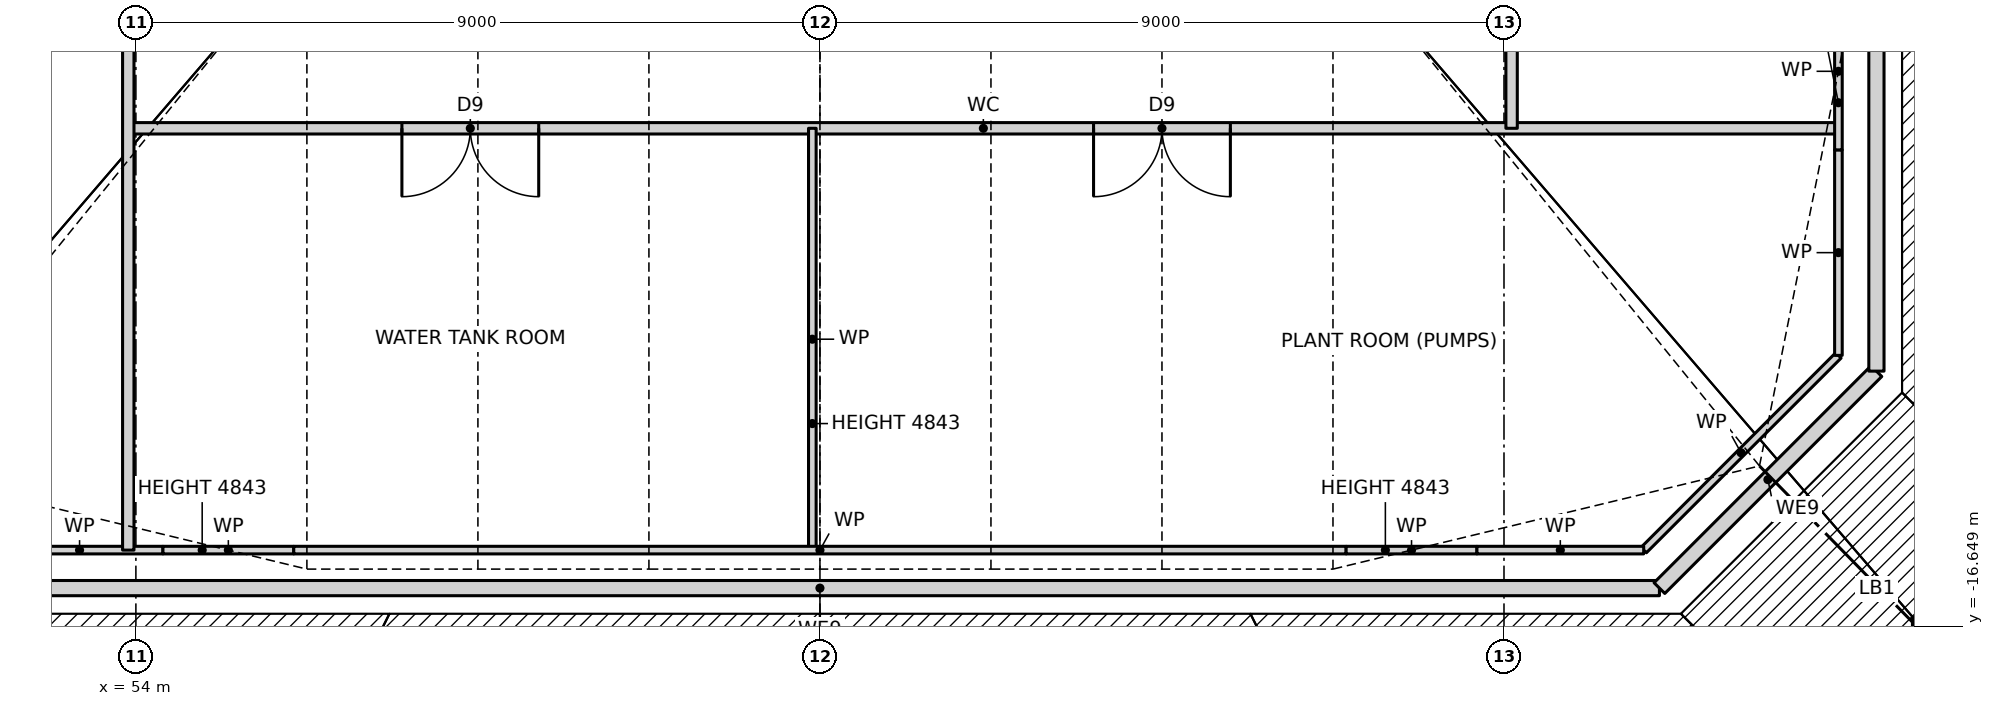
"""IFC4 building model, lengths in metres.
Left out: names, types, materials, properties, quantities, classifications, styles, units other than length and angle.
Written with IfcOpenShell. Run it as: python <this file> out.ifc"""

import sys

from ifc_helpers import new_model, si_unit, direction, frame, frame_2d, origin, origin_2d, place, context, subcontext, project, spatial, rectangle, i_section, extrude, clip, halfspace, element, fill, save


model = new_model("IFC4")
c1 = context("Model", 3, precision=1e-05, world=origin(), true_north=direction((0.0, 1.0)))
c2 = subcontext(c1, "Body", "Model", "MODEL_VIEW")
j1 = project(units=[si_unit("LENGTHUNIT", "METRE"), si_unit("PLANEANGLEUNIT", "RADIAN")], contexts=[c1])
p1 = place(None, origin())
s1 = spatial("IfcSite", under=j1, at=p1, CompositionType="ELEMENT")
p2 = place(p1, origin())
s2 = spatial("IfcBuilding", under=s1, at=p2, CompositionType="ELEMENT")
p3 = place(p2, frame((0.0, 0.0, 74.5)))
s3 = spatial("IfcBuildingStorey", under=s2, at=p3, CompositionType="ELEMENT", Elevation=74.5)
p4 = place(p3, frame((54.9, -18.15, 0.0), z_axis=(0.206163197348, 0.343580475001, 0.916214600002), x_axis=(-0.857476506072, 0.514523120505, 0.0)))
e1 = element("IfcColumn", 1, at=p4, inside=s3, PredefinedType="COLUMN", context=c2, shape_type="Clipping", body=[
    clip(clip(extrude(i_section(OverallWidth=0.424, OverallDepth=0.475, WebThickness=0.048, FlangeThickness=0.077, at=origin_2d()), origin(), (0.0, 0.0, 1.0), 6.549), halfspace(frame((0.0, 0.0, 0.0), z_axis=(0.0, -0.400687916891, -0.916214600002), x_axis=(-0.857476506072, -0.471413595046, 0.206163197348)), False)), halfspace(frame((0.0, 2.404, 5.497), z_axis=(0.0, 0.400687916891, 0.916214600002), x_axis=(-0.857476506072, -0.471413595046, 0.206163197348)), False)),
])
p5 = place(p3, frame((60.3, -18.15, 0.0), z_axis=(0.070044605522, 0.350261033367, 0.934029422311), x_axis=(-0.980584767795, 0.196095673508, 0.0)))
e2 = element("IfcColumn", 2, at=p5, inside=s3, PredefinedType="COLUMN", context=c2, shape_type="Clipping", body=[
    clip(clip(extrude(i_section(OverallWidth=0.424, OverallDepth=0.475, WebThickness=0.048, FlangeThickness=0.077, at=origin_2d()), origin(), (0.0, 0.0, 1.0), 6.424), halfspace(frame((0.0, 0.0, 0.0), z_axis=(0.0, -0.357196078167, -0.934029422311), x_axis=(-0.980584767795, -0.183159128644, 0.070044605522)), False)), halfspace(frame((0.0, 2.143, 5.604), z_axis=(0.0, 0.357196078167, 0.934029422311), x_axis=(-0.980584767795, -0.183159128644, 0.070044605522)), False)),
])
p6 = place(p3, frame((65.7, -18.15, 0.0), z_axis=(-0.070044605522, 0.350261033367, 0.934029422311), x_axis=(-0.980584767795, -0.196095673508, 0.0)))
e3 = element("IfcColumn", 3, at=p6, inside=s3, PredefinedType="COLUMN", context=c2, shape_type="Clipping", body=[
    clip(clip(extrude(i_section(OverallWidth=0.424, OverallDepth=0.475, WebThickness=0.048, FlangeThickness=0.077, at=origin_2d()), origin(), (0.0, 0.0, 1.0), 6.424), halfspace(frame((0.0, 0.0, 0.0), z_axis=(0.0, -0.357196078167, -0.934029422311), x_axis=(-0.980584767795, 0.183159128644, -0.070044605522)), False)), halfspace(frame((0.0, 2.143, 5.604), z_axis=(0.0, 0.357196078167, 0.934029422311), x_axis=(-0.980584767795, 0.183159128644, -0.070044605522)), False)),
])
p7 = place(p3, frame((71.1, -18.15, 0.0), z_axis=(-0.206163197348, 0.343580475001, 0.916214600002), x_axis=(-0.857476506072, -0.514523120505, 0.0)))
e4 = element("IfcColumn", 4, at=p7, inside=s3, PredefinedType="COLUMN", context=c2, shape_type="Clipping", body=[
    clip(clip(extrude(i_section(OverallWidth=0.424, OverallDepth=0.475, WebThickness=0.048, FlangeThickness=0.077, at=origin_2d()), origin(), (0.0, 0.0, 1.0), 6.549), halfspace(frame((0.0, 0.0, 0.0), z_axis=(0.0, -0.400687916891, -0.916214600002), x_axis=(-0.857476506072, 0.471413595046, -0.206163197348)), False)), halfspace(frame((0.0, 2.404, 5.497), z_axis=(0.0, 0.400687916891, 0.916214600002), x_axis=(-0.857476506072, 0.471413595046, -0.206163197348)), False)),
])
p8 = place(p3, frame((77.606, -16.797, 0.0), z_axis=(-0.330551321937, 0.331953334069, 0.883483337458), x_axis=(-0.708601594959, -0.705608800698, 0.0)))
e5 = element("IfcColumn", 5, at=p8, inside=s3, PredefinedType="COLUMN", context=c2, shape_type="Clipping", body=[
    clip(clip(extrude(i_section(OverallWidth=0.424, OverallDepth=0.475, WebThickness=0.048, FlangeThickness=0.077, at=origin_2d()), origin(), (0.0, 0.0, 1.0), 6.791), halfspace(frame((0.0, 0.0, 0.0), z_axis=(0.0, -0.468462583814, -0.883483337458), x_axis=(-0.708601594959, 0.62339361818, -0.330551321937)), False)), halfspace(frame((0.0, 2.811, 5.301), z_axis=(0.0, 0.468462583814, 0.883483337458), x_axis=(-0.708601594959, 0.62339361818, -0.330551321937)), False)),
])
p9 = place(p3, frame((78.9, -9.45, 0.0), z_axis=(-0.343583115532, 0.206127500627, 0.91622164142), x_axis=(-0.514454704863, -0.857517554715, 0.0)))
e6 = element("IfcColumn", 6, at=p9, inside=s3, PredefinedType="COLUMN", context=c2, shape_type="Clipping", body=[
    clip(clip(extrude(i_section(OverallWidth=0.424, OverallDepth=0.475, WebThickness=0.048, FlangeThickness=0.077, at=origin_2d()), origin(), (0.0, 0.0, 1.0), 6.549), halfspace(frame((0.0, 0.0, 0.0), z_axis=(0.0, -0.400671815572, -0.91622164142), x_axis=(-0.514454704863, 0.785676141527, -0.343583115532)), False)), halfspace(frame((0.0, 2.404, 5.497), z_axis=(0.0, 0.400671815572, 0.91622164142), x_axis=(-0.514454704863, 0.785676141527, -0.343583115532)), False)),
])
p10 = place(p3, frame((51.955, -16.15, 0.0), z_axis=(0.0, 0.0, 1.0), x_axis=(1.0, 0.0, 0.0)))
e7 = element("IfcWall", 7, at=p10, inside=s3, PredefinedType="PARTITIONING", context=c2, shape_type="SweptSolid", body=[
    extrude(rectangle(XDim=22.09, YDim=0.2, at=frame_2d((11.045, 0.0))), origin(), (0.0, 0.0, 1.0), 5.7),
])
p11 = place(p3, frame((74.045, -16.15, 0.0), z_axis=(0.0, 0.0, 1.0), x_axis=(0.707106781187, 0.707106781187, 0.0)))
e8 = element("IfcWall", 8, at=p11, inside=s3, PredefinedType="PARTITIONING", context=c2, shape_type="SweptSolid", body=[
    extrude(rectangle(XDim=4.038, YDim=0.2, at=frame_2d((2.019, 0.0))), origin(), (0.0, 0.0, 1.0), 5.7),
])
p12 = place(p3, frame((76.9, -13.295, 0.0), z_axis=(0.0, 0.0, 1.0), x_axis=(0.0, 1.0, 0.0)))
e9 = element("IfcWall", 9, at=p12, inside=s3, PredefinedType="PARTITIONING", context=c2, shape_type="SweptSolid", body=[
    extrude(rectangle(XDim=26.59, YDim=0.2, at=frame_2d((13.295, 0.0))), origin(), (0.0, 0.0, 1.0), 5.7),
])
p13 = place(p3, frame((52.162, -15.65, 0.0), z_axis=(0.0, 0.0, 1.0), x_axis=(1.0, 0.0, 0.0)))
e10 = element("IfcWall", 10, at=p13, inside=s3, PredefinedType="PARTITIONING", context=c2, shape_type="SweptSolid", body=[
    extrude(rectangle(XDim=2.194, YDim=0.1, at=frame_2d((1.097, 0.0))), origin(), (0.0, 0.0, 1.0), 5.77),
])
p14 = place(p3, frame((53.9, -10.1, 0.0), z_axis=(0.0, 0.0, 1.0), x_axis=(1.0, 0.0, 0.0)))
e11 = element("IfcWall", 11, at=p14, inside=s3, PredefinedType="PARTITIONING", context=c2, shape_type="SweptSolid", body=[
    extrude(rectangle(XDim=22.5, YDim=0.15, at=frame_2d((11.25, 0.0))), origin(), (0.0, 0.0, 1.0), 5.77),
])
p15 = place(p14, frame((3.6, 0.0, 0.0)))
e12 = element("IfcOpeningElement", 12, at=p15, cuts=e11, PredefinedType="OPENING", context=c2, shape_type="SweptSolid", body=[
    extrude(rectangle(XDim=1.8, YDim=2.1, at=frame_2d((0.9, 1.05))), frame((0.0, 0.085, 0.0), z_axis=(0.0, -1.0, 0.0), x_axis=(1.0, 0.0, 0.0)), (0.0, 0.0, 1.0), 0.17),
])
p16 = place(p14, frame((12.7, 0.0, 0.0)))
e13 = element("IfcOpeningElement", 13, at=p16, cuts=e11, PredefinedType="OPENING", context=c2, shape_type="SweptSolid", body=[
    extrude(rectangle(XDim=1.8, YDim=2.1, at=frame_2d((0.9, 1.05))), frame((0.0, 0.085, 0.0), z_axis=(0.0, -1.0, 0.0), x_axis=(1.0, 0.0, 0.0)), (0.0, 0.0, 1.0), 0.17),
])
p17 = place(p3, frame((73.838, -15.65, 0.0), z_axis=(0.0, 0.0, 1.0), x_axis=(0.707106781187, 0.707106781187, 0.0)))
e14 = element("IfcWall", 14, at=p17, inside=s3, PredefinedType="PARTITIONING", context=c2, shape_type="SweptSolid", body=[
    extrude(rectangle(XDim=3.623, YDim=0.1, at=frame_2d((1.812, 0.0))), origin(), (0.0, 0.0, 1.0), 5.77),
])
p18 = place(p3, frame((76.4, -13.088, 0.0), z_axis=(0.0, 0.0, 1.0), x_axis=(0.0, 1.0, 0.0)))
e15 = element("IfcWall", 15, at=p18, inside=s3, PredefinedType="PARTITIONING", context=c2, shape_type="SweptSolid", body=[
    extrude(rectangle(XDim=2.704, YDim=0.1, at=frame_2d((1.352, 0.0))), origin(), (0.0, 0.0, 1.0), 5.77),
])
p19 = place(p3, frame((72.1, -10.1, 0.0), z_axis=(0.0, 0.0, 1.0), x_axis=(0.0, 1.0, 0.0)))
e16 = element("IfcWall", 16, at=p19, inside=s3, PredefinedType="PARTITIONING", context=c2, shape_type="SweptSolid", body=[
    extrude(rectangle(XDim=25.75, YDim=0.15, at=frame_2d((12.875, 0.0))), origin(), (0.0, 0.0, 1.0), 5.77),
])
p20 = place(p19, frame((9.2, 0.0, 0.0)))
e17 = element("IfcOpeningElement", 17, at=p20, cuts=e16, PredefinedType="OPENING", context=c2, shape_type="SweptSolid", body=[
    extrude(rectangle(XDim=1.8, YDim=2.1, at=frame_2d((0.9, 1.05))), frame((0.0, 0.085, 0.0), z_axis=(0.0, -1.0, 0.0), x_axis=(1.0, 0.0, 0.0)), (0.0, 0.0, 1.0), 0.17),
])
p21 = place(p3, frame((62.9, -15.65, 0.0), z_axis=(0.0, 0.0, 1.0), x_axis=(0.0, 1.0, 0.0)))
e18 = element("IfcWall", 18, at=p21, inside=s3, PredefinedType="PARTITIONING", context=c2, shape_type="SweptSolid", body=[
    extrude(rectangle(XDim=5.55, YDim=0.1, at=frame_2d((2.775, 0.0))), origin(), (0.0, 0.0, 1.0), 4.843),
])
p22 = place(p3, frame((53.9, -15.65, 0.0), z_axis=(0.0, 0.0, 1.0), x_axis=(0.0, 1.0, 0.0)))
e19 = element("IfcWall", 19, at=p22, inside=s3, PredefinedType="PARTITIONING", context=c2, shape_type="SweptSolid", body=[
    extrude(rectangle(XDim=25.75, YDim=0.15, at=frame_2d((12.875, 0.0))), origin(), (0.0, 0.0, 1.0), 5.77),
])
p23 = place(p22, frame((14.75, 0.0, 0.0)))
e20 = element("IfcOpeningElement", 20, at=p23, cuts=e19, PredefinedType="OPENING", context=c2, shape_type="SweptSolid", body=[
    extrude(rectangle(XDim=1.8, YDim=2.1, at=frame_2d((0.9, 1.05))), frame((0.0, 0.085, 0.0), z_axis=(0.0, -1.0, 0.0), x_axis=(1.0, 0.0, 0.0)), (0.0, 0.0, 1.0), 0.17),
])
p24 = place(p3, frame((54.356, -15.65, 0.0), z_axis=(0.0, 0.0, 1.0), x_axis=(1.0, 0.0, 0.0)))
e21 = element("IfcWall", 21, at=p24, inside=s3, PredefinedType="PARTITIONING", context=c2, shape_type="SweptSolid", body=[
    extrude(rectangle(XDim=1.721, YDim=0.1, at=frame_2d((0.86, 0.0))), origin(), (0.0, 0.0, 1.0), 4.843),
])
p25 = place(p3, frame((56.077, -15.65, 0.0), z_axis=(0.0, 0.0, 1.0), x_axis=(1.0, 0.0, 0.0)))
e22 = element("IfcWall", 22, at=p25, inside=s3, PredefinedType="PARTITIONING", context=c2, shape_type="SweptSolid", body=[
    extrude(rectangle(XDim=13.846, YDim=0.1, at=frame_2d((6.923, 0.0))), origin(), (0.0, 0.0, 1.0), 5.77),
])
p26 = place(p3, frame((69.923, -15.65, 0.0), z_axis=(0.0, 0.0, 1.0), x_axis=(1.0, 0.0, 0.0)))
e23 = element("IfcWall", 23, at=p26, inside=s3, PredefinedType="PARTITIONING", context=c2, shape_type="SweptSolid", body=[
    extrude(rectangle(XDim=1.721, YDim=0.1, at=frame_2d((0.86, 0.0))), origin(), (0.0, 0.0, 1.0), 4.843),
])
p27 = place(p3, frame((71.644, -15.65, 0.0), z_axis=(0.0, 0.0, 1.0), x_axis=(1.0, 0.0, 0.0)))
e24 = element("IfcWall", 24, at=p27, inside=s3, PredefinedType="PARTITIONING", context=c2, shape_type="SweptSolid", body=[
    extrude(rectangle(XDim=2.194, YDim=0.1, at=frame_2d((1.097, 0.0))), origin(), (0.0, 0.0, 1.0), 5.77),
])
p28 = place(p3, frame((76.4, -10.384, 0.0), z_axis=(0.0, 0.0, 1.0), x_axis=(0.0, 1.0, 0.0)))
e25 = element("IfcWall", 25, at=p28, inside=s3, PredefinedType="PARTITIONING", context=c2, shape_type="SweptSolid", body=[
    extrude(rectangle(XDim=2.068, YDim=0.1, at=frame_2d((1.034, 0.0))), origin(), (0.0, 0.0, 1.0), 4.843),
])
p29 = place(p15, frame((1.8, 0.0, 0.0), z_axis=(0.0, 0.0, 1.0), x_axis=(-1.0, 0.0, 0.0)))
e26 = element("IfcDoor", 26, at=p29, inside=s3, OperationType="DOUBLE_DOOR_SINGLE_SWING", PredefinedType="DOOR", context=c2, shape_type="SweptSolid", body=[
    extrude(rectangle(XDim=1.8, YDim=2.1, at=frame_2d((0.9, 1.05))), frame((0.0, 0.025, 0.0), z_axis=(0.0, -1.0, 0.0), x_axis=(1.0, 0.0, 0.0)), (0.0, 0.0, 1.0), 0.05),
])
fill(e12, e26)
p30 = place(p16, frame((1.8, 0.0, 0.0), z_axis=(0.0, 0.0, 1.0), x_axis=(-1.0, 0.0, 0.0)))
e27 = element("IfcDoor", 27, at=p30, inside=s3, OperationType="DOUBLE_DOOR_SINGLE_SWING", PredefinedType="DOOR", context=c2, shape_type="SweptSolid", body=[
    extrude(rectangle(XDim=1.8, YDim=2.1, at=frame_2d((0.9, 1.05))), frame((0.0, 0.025, 0.0), z_axis=(0.0, -1.0, 0.0), x_axis=(1.0, 0.0, 0.0)), (0.0, 0.0, 1.0), 0.05),
])
fill(e13, e27)
save(model, sys.argv[1])
